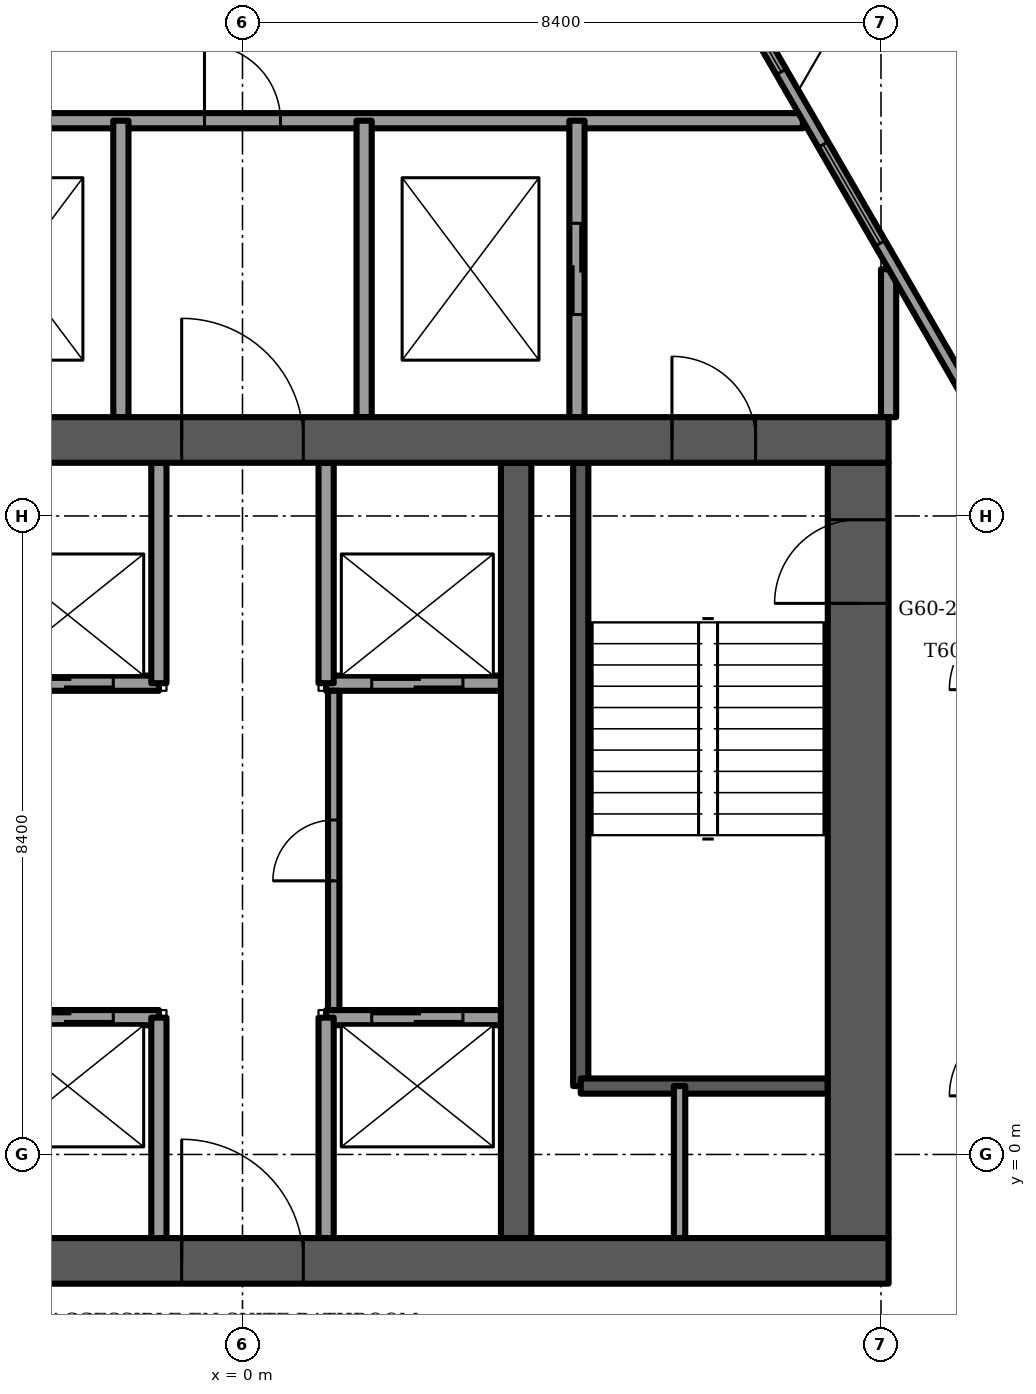
"""IFC4 building model, lengths in metres.
Left out: names, types, materials, properties, quantities, classifications, styles, units other than length and angle.
Written with IfcOpenShell. Run it as: python <this file> out.ifc"""

import sys

from ifc_helpers import new_model, si_unit, direction, frame, frame_2d, origin, place, context, subcontext, project, spatial, rectangle, extrude, element, fill, save


model = new_model("IFC4")
c1 = context("Model", 3, precision=1e-05, world=origin(), true_north=direction((0.0, 1.0)))
c2 = subcontext(c1, "Body", "Model", "MODEL_VIEW")
j1 = project(units=[si_unit("LENGTHUNIT", "METRE"), si_unit("PLANEANGLEUNIT", "RADIAN")], contexts=[c1])
p1 = place(None, origin())
s1 = spatial("IfcSite", under=j1, at=p1, CompositionType="ELEMENT")
p2 = place(p1, origin())
s2 = spatial("IfcBuilding", under=s1, at=p2, CompositionType="ELEMENT")
p3 = place(p2, frame((0.0, 0.0, 245.0)))
s3 = spatial("IfcBuildingStorey", under=s2, at=p3, CompositionType="ELEMENT", Elevation=245.0)
p4 = place(p3, frame((-8.5, -1.4, -0.3), z_axis=(0.0, 0.0, 1.0), x_axis=(1.0, 0.0, 0.0)))
e1 = element("IfcWall", 1, at=p4, inside=s3, PredefinedType="SHEAR", context=c2, shape_type="SweptSolid", body=[
    extrude(rectangle(XDim=17.0, YDim=0.6, at=frame_2d((8.5, 0.0))), origin(), (0.0, 0.0, 1.0), 3.75),
])
p5 = place(p4, frame((7.7, 0.0, 0.0)))
e2 = element("IfcOpeningElement", 2, at=p5, cuts=e1, PredefinedType="OPENING", context=c2, shape_type="SweptSolid", body=[
    extrude(rectangle(XDim=1.6, YDim=2.1, at=frame_2d((0.8, 1.05))), frame((0.0, 0.3, 0.0), z_axis=(0.0, -1.0, 0.0), x_axis=(1.0, 0.0, 0.0)), (0.0, 0.0, 1.0), 0.6),
])
p6 = place(p3, frame((-8.5, 9.4, -0.3), z_axis=(0.0, 0.0, 1.0), x_axis=(1.0, 0.0, 0.0)))
e3 = element("IfcWall", 3, at=p6, inside=s3, PredefinedType="SHEAR", context=c2, shape_type="SweptSolid", body=[
    extrude(rectangle(XDim=17.0, YDim=0.6, at=frame_2d((8.5, 0.0))), origin(), (0.0, 0.0, 1.0), 3.75),
])
p7 = place(p6, frame((7.7, 0.0, 0.0)))
e4 = element("IfcOpeningElement", 4, at=p7, cuts=e3, PredefinedType="OPENING", context=c2, shape_type="SweptSolid", body=[
    extrude(rectangle(XDim=1.6, YDim=2.1, at=frame_2d((0.8, 1.05))), frame((0.0, 0.3, 0.0), z_axis=(0.0, -1.0, 0.0), x_axis=(1.0, 0.0, 0.0)), (0.0, 0.0, 1.0), 0.6),
])
p8 = place(p6, frame((1.75, 0.0, 0.0)))
e5 = element("IfcOpeningElement", 5, at=p8, cuts=e3, PredefinedType="OPENING", context=c2, shape_type="SweptSolid", body=[
    extrude(rectangle(XDim=1.1, YDim=2.1, at=frame_2d((0.55, 1.05))), frame((0.0, 0.3, 0.0), z_axis=(0.0, -1.0, 0.0), x_axis=(1.0, 0.0, 0.0)), (0.0, 0.0, 1.0), 0.6),
])
p9 = place(p6, frame((14.15, 0.0, 0.0)))
e6 = element("IfcOpeningElement", 6, at=p9, cuts=e3, PredefinedType="OPENING", context=c2, shape_type="SweptSolid", body=[
    extrude(rectangle(XDim=1.1, YDim=2.1, at=frame_2d((0.55, 1.05))), frame((0.0, 0.3, 0.0), z_axis=(0.0, -1.0, 0.0), x_axis=(1.0, 0.0, 0.0)), (0.0, 0.0, 1.0), 0.6),
])
p10 = place(p3, frame((8.1, -1.1, -0.3), z_axis=(0.0, 0.0, 1.0), x_axis=(0.0, 1.0, 0.0)))
e7 = element("IfcWall", 7, at=p10, inside=s3, PredefinedType="SHEAR", context=c2, shape_type="SweptSolid", body=[
    extrude(rectangle(XDim=10.2, YDim=0.8, at=frame_2d((5.1, 0.0))), origin(), (0.0, 0.0, 1.0), 3.75),
])
p11 = place(p10, frame((8.35, 0.0, 0.0)))
e8 = element("IfcOpeningElement", 8, at=p11, cuts=e7, PredefinedType="OPENING", context=c2, shape_type="SweptSolid", body=[
    extrude(rectangle(XDim=1.1, YDim=2.1, at=frame_2d((0.55, 1.05))), frame((0.0, 0.4, 0.0), z_axis=(0.0, -1.0, 0.0), x_axis=(1.0, 0.0, 0.0)), (0.0, 0.0, 1.0), 0.8),
])
p12 = place(p3, frame((3.6, -1.1, -0.3), z_axis=(0.0, 0.0, 1.0), x_axis=(0.0, 1.0, 0.0)))
e9 = element("IfcWall", 9, at=p12, inside=s3, PredefinedType="SHEAR", context=c2, shape_type="SweptSolid", body=[
    extrude(rectangle(XDim=10.2, YDim=0.4, at=frame_2d((5.1, 0.0))), origin(), (0.0, 0.0, 1.0), 3.75),
])
p13 = place(p3, frame((12.142, 11.339, 0.0), z_axis=(0.0, 0.0, 1.0), x_axis=(-0.500008985279, 0.866020216069, 0.0)))
e10 = element("IfcWall", 10, at=p13, inside=s3, PredefinedType="PARAPET", context=c2, shape_type="SweptSolid", body=[
    extrude(rectangle(XDim=5.876, YDim=0.9, at=frame_2d((2.938, 0.0))), origin(), (0.0, 0.0, 1.0), 1.1),
])
p14 = place(p3, frame((8.731, -12.727, 0.0), z_axis=(0.0, 0.0, 1.0), x_axis=(0.499997087355, 0.866027085394, 0.0)))
e11 = element("IfcWall", 11, at=p14, inside=s3, PredefinedType="SOLIDWALL", context=c2, shape_type="SweptSolid", body=[
    extrude(rectangle(XDim=13.312, YDim=0.15, at=frame_2d((6.656, 0.0))), origin(), (0.0, 0.0, 1.0), 3.45),
])
p15 = place(p14, frame((2.756, 0.0, 0.15)))
e12 = element("IfcOpeningElement", 12, at=p15, cuts=e11, PredefinedType="OPENING", context=c2, shape_type="SweptSolid", body=[
    extrude(rectangle(XDim=1.5, YDim=2.85, at=frame_2d((0.75, 1.425))), frame((0.0, 0.075, 0.0), z_axis=(0.0, -1.0, 0.0), x_axis=(1.0, 0.0, 0.0)), (0.0, 0.0, 1.0), 0.15),
])
p16 = place(p14, frame((4.956, 0.0, 0.0)))
e13 = element("IfcOpeningElement", 13, at=p16, cuts=e11, PredefinedType="OPENING", context=c2, shape_type="SweptSolid", body=[
    extrude(rectangle(XDim=1.4, YDim=2.4, at=frame_2d((0.7, 1.2))), frame((0.0, 0.075, 0.0), z_axis=(0.0, -1.0, 0.0), x_axis=(1.0, 0.0, 0.0)), (0.0, 0.0, 1.0), 0.15),
])
p17 = place(p14, frame((6.956, 0.0, 0.15)))
e14 = element("IfcOpeningElement", 14, at=p17, cuts=e11, PredefinedType="OPENING", context=c2, shape_type="SweptSolid", body=[
    extrude(rectangle(XDim=0.9, YDim=2.85, at=frame_2d((0.45, 1.425))), frame((0.0, 0.075, 0.0), z_axis=(0.0, -1.0, 0.0), x_axis=(1.0, 0.0, 0.0)), (0.0, 0.0, 1.0), 0.15),
])
p18 = place(p14, frame((8.149, 0.0, 0.0)))
e15 = element("IfcOpeningElement", 15, at=p18, cuts=e11, PredefinedType="OPENING", context=c2, shape_type="SweptSolid", body=[
    extrude(rectangle(XDim=1.4, YDim=2.4, at=frame_2d((0.7, 1.2))), frame((0.0, 0.075, 0.0), z_axis=(0.0, -1.0, 0.0), x_axis=(1.0, 0.0, 0.0)), (0.0, 0.0, 1.0), 0.15),
])
p19 = place(p14, frame((11.385, 0.0, 0.15)))
e16 = element("IfcOpeningElement", 16, at=p19, cuts=e11, PredefinedType="OPENING", context=c2, shape_type="SweptSolid", body=[
    extrude(rectangle(XDim=1.5, YDim=2.73, at=frame_2d((0.75, 1.365))), frame((0.0, 0.075, 0.0), z_axis=(0.0, -1.0, 0.0), x_axis=(1.0, 0.0, 0.0)), (0.0, 0.0, 1.0), 0.15),
])
p20 = place(p3, frame((15.387, -0.133, 0.0), z_axis=(0.0, 0.0, 1.0), x_axis=(-0.499998651697, 0.866026182226, 0.0)))
e17 = element("IfcWall", 17, at=p20, inside=s3, PredefinedType="SOLIDWALL", context=c2, shape_type="SweptSolid", body=[
    extrude(rectangle(XDim=18.389, YDim=0.15, at=frame_2d((9.195, 0.0))), origin(), (0.0, 0.0, 1.0), 3.45),
])
p21 = place(p20, frame((3.909, 0.0, 0.15)))
e18 = element("IfcOpeningElement", 18, at=p21, cuts=e17, PredefinedType="OPENING", context=c2, shape_type="SweptSolid", body=[
    extrude(rectangle(XDim=0.9, YDim=2.85, at=frame_2d((0.45, 1.425))), frame((0.0, 0.075, 0.0), z_axis=(0.0, -1.0, 0.0), x_axis=(1.0, 0.0, 0.0)), (0.0, 0.0, 1.0), 0.15),
])
p22 = place(p20, frame((6.109, 0.0, 0.15)))
e19 = element("IfcOpeningElement", 19, at=p22, cuts=e17, PredefinedType="OPENING", context=c2, shape_type="SweptSolid", body=[
    extrude(rectangle(XDim=1.4, YDim=2.85, at=frame_2d((0.7, 1.425))), frame((0.0, 0.075, 0.0), z_axis=(0.0, -1.0, 0.0), x_axis=(1.0, 0.0, 0.0)), (0.0, 0.0, 1.0), 0.15),
])
p23 = place(p20, frame((10.603, 0.0, 0.15)))
e20 = element("IfcOpeningElement", 20, at=p23, cuts=e17, PredefinedType="OPENING", context=c2, shape_type="SweptSolid", body=[
    extrude(rectangle(XDim=0.9, YDim=2.85, at=frame_2d((0.45, 1.425))), frame((0.0, 0.075, 0.0), z_axis=(0.0, -1.0, 0.0), x_axis=(1.0, 0.0, 0.0)), (0.0, 0.0, 1.0), 0.15),
])
p24 = place(p20, frame((8.503, 0.0, 0.15)))
e21 = element("IfcOpeningElement", 21, at=p24, cuts=e17, PredefinedType="OPENING", context=c2, shape_type="SweptSolid", body=[
    extrude(rectangle(XDim=1.4, YDim=2.85, at=frame_2d((0.7, 1.425))), frame((0.0, 0.075, 0.0), z_axis=(0.0, -1.0, 0.0), x_axis=(1.0, 0.0, 0.0)), (0.0, 0.0, 1.0), 0.15),
])
p25 = place(p20, frame((13.996, 0.0, 0.15)))
e22 = element("IfcOpeningElement", 22, at=p25, cuts=e17, PredefinedType="OPENING", context=c2, shape_type="SweptSolid", body=[
    extrude(rectangle(XDim=1.5, YDim=2.85, at=frame_2d((0.75, 1.425))), frame((0.0, 0.075, 0.0), z_axis=(0.0, -1.0, 0.0), x_axis=(1.0, 0.0, 0.0)), (0.0, 0.0, 1.0), 0.15),
])
p26 = place(p20, frame((1.004, 0.0, 0.15)))
e23 = element("IfcOpeningElement", 23, at=p26, cuts=e17, PredefinedType="OPENING", context=c2, shape_type="SweptSolid", body=[
    extrude(rectangle(XDim=1.5, YDim=2.73, at=frame_2d((0.75, 1.365))), frame((0.0, 0.075, 0.0), z_axis=(0.0, -1.0, 0.0), x_axis=(1.0, 0.0, 0.0)), (0.0, 0.0, 1.0), 0.15),
])
p27 = place(p20, frame((16.599, 0.0, 0.15)))
e24 = element("IfcOpeningElement", 24, at=p27, cuts=e17, PredefinedType="OPENING", context=c2, shape_type="SweptSolid", body=[
    extrude(rectangle(XDim=1.5, YDim=2.73, at=frame_2d((0.75, 1.365))), frame((0.0, 0.075, 0.0), z_axis=(0.0, -1.0, 0.0), x_axis=(1.0, 0.0, 0.0)), (0.0, 0.0, 1.0), 0.15),
])
p28 = place(p3, frame((-3.4, 1.8, 0.0), z_axis=(0.0, 0.0, 1.0), x_axis=(1.0, 0.0, 0.0)))
e25 = element("IfcWall", 25, at=p28, inside=s3, PredefinedType="PARTITIONING", context=c2, shape_type="SweptSolid", body=[
    extrude(rectangle(XDim=2.3, YDim=0.2, at=frame_2d((1.15, 0.0))), origin(), (0.0, 0.0, 1.0), 3.45),
])
p29 = place(p28, frame((0.5, 0.0, 0.0)))
e26 = element("IfcOpeningElement", 26, at=p29, cuts=e25, PredefinedType="OPENING", context=c2, shape_type="SweptSolid", body=[
    extrude(rectangle(XDim=1.2, YDim=2.1, at=frame_2d((0.6, 1.05))), frame((0.0, 0.1, 0.0), z_axis=(0.0, -1.0, 0.0), x_axis=(1.0, 0.0, 0.0)), (0.0, 0.0, 1.0), 0.2),
])
p30 = place(p3, frame((-3.4, 6.2, 0.0), z_axis=(0.0, 0.0, 1.0), x_axis=(1.0, 0.0, 0.0)))
e27 = element("IfcWall", 27, at=p30, inside=s3, PredefinedType="PARTITIONING", context=c2, shape_type="SweptSolid", body=[
    extrude(rectangle(XDim=2.3, YDim=0.2, at=frame_2d((1.15, 0.0))), origin(), (0.0, 0.0, 1.0), 3.45),
])
p31 = place(p30, frame((0.5, 0.0, 0.0)))
e28 = element("IfcOpeningElement", 28, at=p31, cuts=e27, PredefinedType="OPENING", context=c2, shape_type="SweptSolid", body=[
    extrude(rectangle(XDim=1.2, YDim=2.1, at=frame_2d((0.6, 1.05))), frame((0.0, 0.1, 0.0), z_axis=(0.0, -1.0, 0.0), x_axis=(1.0, 0.0, 0.0)), (0.0, 0.0, 1.0), 0.2),
])
p32 = place(p3, frame((1.1, 1.8, 0.0), z_axis=(0.0, 0.0, 1.0), x_axis=(1.0, 0.0, 0.0)))
e29 = element("IfcWall", 29, at=p32, inside=s3, PredefinedType="PARTITIONING", context=c2, shape_type="SweptSolid", body=[
    extrude(rectangle(XDim=2.3, YDim=0.2, at=frame_2d((1.15, 0.0))), origin(), (0.0, 0.0, 1.0), 3.45),
])
p33 = place(p32, frame((0.6, 0.0, 0.0)))
e30 = element("IfcOpeningElement", 30, at=p33, cuts=e29, PredefinedType="OPENING", context=c2, shape_type="SweptSolid", body=[
    extrude(rectangle(XDim=1.2, YDim=2.1, at=frame_2d((0.6, 1.05))), frame((0.0, 0.1, 0.0), z_axis=(0.0, -1.0, 0.0), x_axis=(1.0, 0.0, 0.0)), (0.0, 0.0, 1.0), 0.2),
])
p34 = place(p3, frame((1.1, 6.2, 0.0), z_axis=(0.0, 0.0, 1.0), x_axis=(1.0, 0.0, 0.0)))
e31 = element("IfcWall", 31, at=p34, inside=s3, PredefinedType="PARTITIONING", context=c2, shape_type="SweptSolid", body=[
    extrude(rectangle(XDim=2.3, YDim=0.2, at=frame_2d((1.15, 0.0))), origin(), (0.0, 0.0, 1.0), 3.45),
])
p35 = place(p34, frame((0.6, 0.0, 0.0)))
e32 = element("IfcOpeningElement", 32, at=p35, cuts=e31, PredefinedType="OPENING", context=c2, shape_type="SweptSolid", body=[
    extrude(rectangle(XDim=1.2, YDim=2.1, at=frame_2d((0.6, 1.05))), frame((0.0, 0.1, 0.0), z_axis=(0.0, -1.0, 0.0), x_axis=(1.0, 0.0, 0.0)), (0.0, 0.0, 1.0), 0.2),
])
for number, where, z_axis, x_axis in (
    (33, (-1.1, -1.1, 0.0), (0.0, 0.0, 1.0), (0.0, 1.0, 0.0)),
    (34, (1.1, -1.1, 0.0), (0.0, 0.0, 1.0), (0.0, 1.0, 0.0)),
    (35, (-1.1, 6.2, 0.0), (0.0, 0.0, 1.0), (0.0, 1.0, 0.0)),
    (36, (1.1, 6.2, 0.0), (0.0, 0.0, 1.0), (0.0, 1.0, 0.0)),
):
    element("IfcWall", number, at=place(p3, frame(where, z_axis=z_axis, x_axis=x_axis)), inside=s3, PredefinedType="PARTITIONING", context=c2, shape_type="SweptSolid", body=[
        extrude(rectangle(XDim=2.9, YDim=0.2, at=frame_2d((1.45, 0.0))), origin(), (0.0, 0.0, 1.0), 3.45),
    ])
p36 = place(p3, frame((4.45, 0.9, -0.3), z_axis=(0.0, 0.0, 1.0), x_axis=(0.0, 1.0, 0.0)))
e37 = element("IfcWall", 37, at=p36, inside=s3, PredefinedType="SOLIDWALL", context=c2, shape_type="SweptSolid", body=[
    extrude(rectangle(XDim=8.2, YDim=0.2, at=frame_2d((4.1, 0.0))), origin(), (0.0, 0.0, 1.0), 3.75),
])
p37 = place(p3, frame((4.45, 0.9, -0.3), z_axis=(0.0, 0.0, 1.0), x_axis=(1.0, 0.0, 0.0)))
e38 = element("IfcWall", 38, at=p37, inside=s3, PredefinedType="SOLIDWALL", context=c2, shape_type="SweptSolid", body=[
    extrude(rectangle(XDim=3.25, YDim=0.2, at=frame_2d((1.625, 0.0))), origin(), (0.0, 0.0, 1.0), 3.75),
])
p38 = place(p3, frame((5.75, -1.1, 0.0), z_axis=(0.0, 0.0, 1.0), x_axis=(0.0, 1.0, 0.0)))
e39 = element("IfcWall", 39, at=p38, inside=s3, PredefinedType="PARTITIONING", context=c2, shape_type="SweptSolid", body=[
    extrude(rectangle(XDim=2.0, YDim=0.15, at=frame_2d((1.0, 0.0))), origin(), (0.0, 0.0, 1.0), 3.45),
])
p39 = place(p3, frame((-7.372, 13.6, 0.0), z_axis=(0.0, 0.0, 1.0), x_axis=(1.0, 0.0, 0.0)))
e40 = element("IfcWall", 40, at=p39, inside=s3, PredefinedType="PARTITIONING", context=c2, shape_type="SweptSolid", body=[
    extrude(rectangle(XDim=14.745, YDim=0.2, at=frame_2d((7.372, 0.0))), origin(), (0.0, 0.0, 1.0), 3.45),
])
p40 = place(p39, frame((6.872, 0.0, 0.0)))
e41 = element("IfcOpeningElement", 41, at=p40, cuts=e40, PredefinedType="OPENING", context=c2, shape_type="SweptSolid", body=[
    extrude(rectangle(XDim=1.0, YDim=2.1, at=frame_2d((0.5, 1.05))), frame((0.0, 0.1, 0.0), z_axis=(0.0, -1.0, 0.0), x_axis=(1.0, 0.0, 0.0)), (0.0, 0.0, 1.0), 0.2),
])
p41 = place(p3, frame((8.5, 9.7, 0.0), z_axis=(0.0, 0.0, 1.0), x_axis=(0.0, 1.0, 0.0)))
e42 = element("IfcWall", 42, at=p41, inside=s3, PredefinedType="PARTITIONING", context=c2, shape_type="SweptSolid", body=[
    extrude(rectangle(XDim=1.947, YDim=0.2, at=frame_2d((0.973, 0.0))), origin(), (0.0, 0.0, 1.0), 3.45),
])
p42 = place(p3, frame((4.4, 9.7, 0.0), z_axis=(0.0, 0.0, 1.0), x_axis=(0.0, 1.0, 0.0)))
e43 = element("IfcWall", 43, at=p42, inside=s3, PredefinedType="PARTITIONING", context=c2, shape_type="SweptSolid", body=[
    extrude(rectangle(XDim=3.9, YDim=0.2, at=frame_2d((1.95, 0.0))), origin(), (0.0, 0.0, 1.0), 3.45),
])
p43 = place(p42, frame((1.35, 0.0, 0.0)))
e44 = element("IfcOpeningElement", 44, at=p43, cuts=e43, PredefinedType="OPENING", context=c2, shape_type="SweptSolid", body=[
    extrude(rectangle(XDim=1.2, YDim=2.1, at=frame_2d((0.6, 1.05))), frame((0.0, 0.1, 0.0), z_axis=(0.0, -1.0, 0.0), x_axis=(1.0, 0.0, 0.0)), (0.0, 0.0, 1.0), 0.2),
])
for number, where, z_axis, x_axis in (
    (45, (-1.6, 9.7, 0.0), (0.0, 0.0, 1.0), (0.0, 1.0, 0.0)),
    (46, (1.6, 9.7, 0.0), (0.0, 0.0, 1.0), (0.0, 1.0, 0.0)),
):
    element("IfcWall", number, at=place(p3, frame(where, z_axis=z_axis, x_axis=x_axis)), inside=s3, PredefinedType="PARTITIONING", context=c2, shape_type="SweptSolid", body=[
        extrude(rectangle(XDim=3.9, YDim=0.2, at=frame_2d((1.95, 0.0))), origin(), (0.0, 0.0, 1.0), 3.45),
    ])
p44 = place(p3, frame((1.2, 1.9, 0.0), z_axis=(0.0, 0.0, 1.0), x_axis=(0.0, 1.0, 0.0)))
e47 = element("IfcWall", 47, at=p44, inside=s3, PredefinedType="PARTITIONING", context=c2, shape_type="SweptSolid", body=[
    extrude(rectangle(XDim=4.2, YDim=0.15, at=frame_2d((2.1, 0.0))), origin(), (0.0, 0.0, 1.0), 3.45),
])
p45 = place(p44, frame((1.7, 0.0, 0.0)))
e48 = element("IfcOpeningElement", 48, at=p45, cuts=e47, PredefinedType="OPENING", context=c2, shape_type="SweptSolid", body=[
    extrude(rectangle(XDim=0.8, YDim=2.1, at=frame_2d((0.4, 1.05))), frame((0.0, 0.075, 0.0), z_axis=(0.0, -1.0, 0.0), x_axis=(1.0, 0.0, 0.0)), (0.0, 0.0, 1.0), 0.15),
])
p46 = place(p25, origin())
e49 = element("IfcWindow", 49, at=p46, inside=s3, PartitioningType="SINGLE_PANEL", PredefinedType="WINDOW", context=c2, shape_type="SweptSolid", body=[
    extrude(rectangle(XDim=1.5, YDim=2.85, at=frame_2d((0.75, 1.425))), frame((0.0, 0.03, 0.0), z_axis=(0.0, -1.0, 0.0), x_axis=(1.0, 0.0, 0.0)), (0.0, 0.0, 1.0), 0.06),
])
fill(e22, e49)
p47 = place(p27, origin())
e50 = element("IfcWindow", 50, at=p47, inside=s3, PartitioningType="SINGLE_PANEL", PredefinedType="WINDOW", context=c2, shape_type="SweptSolid", body=[
    extrude(rectangle(XDim=1.5, YDim=2.73, at=frame_2d((0.75, 1.365))), frame((0.0, 0.03, 0.0), z_axis=(0.0, -1.0, 0.0), x_axis=(1.0, 0.0, 0.0)), (0.0, 0.0, 1.0), 0.06),
])
fill(e24, e50)
p48 = place(p29, origin())
e51 = element("IfcDoor", 51, at=p48, inside=s3, OperationType="SLIDING_TO_LEFT", PredefinedType="DOOR", context=c2, shape_type="SweptSolid", body=[
    extrude(rectangle(XDim=1.2, YDim=2.1, at=frame_2d((0.6, 1.05))), frame((0.0, 0.025, 0.0), z_axis=(0.0, -1.0, 0.0), x_axis=(1.0, 0.0, 0.0)), (0.0, 0.0, 1.0), 0.05),
])
fill(e26, e51)
p49 = place(p33, origin())
e52 = element("IfcDoor", 52, at=p49, inside=s3, OperationType="SLIDING_TO_LEFT", PredefinedType="DOOR", context=c2, shape_type="SweptSolid", body=[
    extrude(rectangle(XDim=1.2, YDim=2.1, at=frame_2d((0.6, 1.05))), frame((0.0, 0.025, 0.0), z_axis=(0.0, -1.0, 0.0), x_axis=(1.0, 0.0, 0.0)), (0.0, 0.0, 1.0), 0.05),
])
fill(e30, e52)
p50 = place(p31, origin())
e53 = element("IfcDoor", 53, at=p50, inside=s3, OperationType="SLIDING_TO_LEFT", PredefinedType="DOOR", context=c2, shape_type="SweptSolid", body=[
    extrude(rectangle(XDim=1.2, YDim=2.1, at=frame_2d((0.6, 1.05))), frame((0.0, 0.025, 0.0), z_axis=(0.0, -1.0, 0.0), x_axis=(1.0, 0.0, 0.0)), (0.0, 0.0, 1.0), 0.05),
])
fill(e28, e53)
p51 = place(p35, origin())
e54 = element("IfcDoor", 54, at=p51, inside=s3, OperationType="SLIDING_TO_LEFT", PredefinedType="DOOR", context=c2, shape_type="SweptSolid", body=[
    extrude(rectangle(XDim=1.2, YDim=2.1, at=frame_2d((0.6, 1.05))), frame((0.0, 0.025, 0.0), z_axis=(0.0, -1.0, 0.0), x_axis=(1.0, 0.0, 0.0)), (0.0, 0.0, 1.0), 0.05),
])
fill(e32, e54)
p52 = place(p5, origin())
e55 = element("IfcDoor", 55, at=p52, inside=s3, OperationType="DOUBLE_DOOR_SINGLE_SWING", PredefinedType="DOOR", context=c2, shape_type="SweptSolid", body=[
    extrude(rectangle(XDim=1.6, YDim=2.1, at=frame_2d((0.8, 1.05))), frame((0.0, 0.025, 0.0), z_axis=(0.0, -1.0, 0.0), x_axis=(1.0, 0.0, 0.0)), (0.0, 0.0, 1.0), 0.05),
])
fill(e2, e55)
p53 = place(p7, origin())
e56 = element("IfcDoor", 56, at=p53, inside=s3, OperationType="DOUBLE_DOOR_SINGLE_SWING", PredefinedType="DOOR", context=c2, shape_type="SweptSolid", body=[
    extrude(rectangle(XDim=1.6, YDim=2.1, at=frame_2d((0.8, 1.05))), frame((0.0, 0.025, 0.0), z_axis=(0.0, -1.0, 0.0), x_axis=(1.0, 0.0, 0.0)), (0.0, 0.0, 1.0), 0.05),
])
fill(e4, e56)
p54 = place(p9, origin())
e57 = element("IfcDoor", 57, at=p54, inside=s3, OperationType="SINGLE_SWING_RIGHT", PredefinedType="DOOR", context=c2, shape_type="SweptSolid", body=[
    extrude(rectangle(XDim=1.1, YDim=2.1, at=frame_2d((0.55, 1.05))), frame((0.0, 0.025, 0.0), z_axis=(0.0, -1.0, 0.0), x_axis=(1.0, 0.0, 0.0)), (0.0, 0.0, 1.0), 0.05),
])
fill(e6, e57)
p55 = place(p11, origin())
e58 = element("IfcDoor", 58, at=p55, inside=s3, OperationType="SINGLE_SWING_LEFT", PredefinedType="DOOR", context=c2, shape_type="SweptSolid", body=[
    extrude(rectangle(XDim=1.1, YDim=2.1, at=frame_2d((0.55, 1.05))), frame((0.0, 0.025, 0.0), z_axis=(0.0, -1.0, 0.0), x_axis=(1.0, 0.0, 0.0)), (0.0, 0.0, 1.0), 0.05),
])
fill(e8, e58)
p56 = place(p43, origin())
e59 = element("IfcDoor", 59, at=p56, inside=s3, OperationType="SLIDING_TO_LEFT", PredefinedType="DOOR", context=c2, shape_type="SweptSolid", body=[
    extrude(rectangle(XDim=1.2, YDim=2.1, at=frame_2d((0.6, 1.05))), frame((0.0, 0.025, 0.0), z_axis=(0.0, -1.0, 0.0), x_axis=(1.0, 0.0, 0.0)), (0.0, 0.0, 1.0), 0.05),
])
fill(e44, e59)
p57 = place(p40, origin())
e60 = element("IfcDoor", 60, at=p57, inside=s3, OperationType="SINGLE_SWING_LEFT", PredefinedType="DOOR", context=c2, shape_type="SweptSolid", body=[
    extrude(rectangle(XDim=1.0, YDim=2.1, at=frame_2d((0.5, 1.05))), frame((0.0, 0.025, 0.0), z_axis=(0.0, -1.0, 0.0), x_axis=(1.0, 0.0, 0.0)), (0.0, 0.0, 1.0), 0.05),
])
fill(e41, e60)
p58 = place(p45, origin())
e61 = element("IfcDoor", 61, at=p58, inside=s3, OperationType="SINGLE_SWING_RIGHT", PredefinedType="DOOR", context=c2, shape_type="SweptSolid", body=[
    extrude(rectangle(XDim=0.8, YDim=2.1, at=frame_2d((0.4, 1.05))), frame((0.0, 0.025, 0.0), z_axis=(0.0, -1.0, 0.0), x_axis=(1.0, 0.0, 0.0)), (0.0, 0.0, 1.0), 0.05),
])
fill(e48, e61)
save(model, sys.argv[1])
